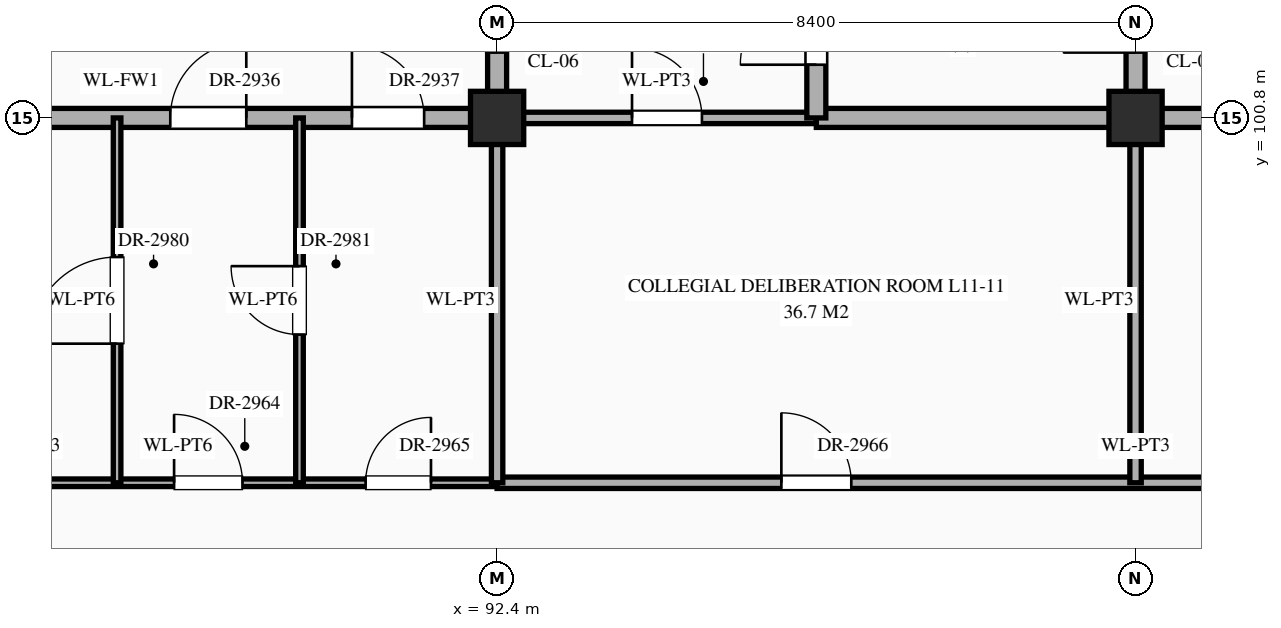
"""IFC4 building model, lengths in metres.
Left out: names, types, materials, properties, quantities, classifications, styles, units other than length and angle.
Written with IfcOpenShell. Run it as: python <this file> out.ifc"""

import sys

from ifc_helpers import new_model, si_unit, direction, frame, frame_2d, origin, origin_2d, place, context, subcontext, project, spatial, rectangle, extrude, element, fill, save


model = new_model("IFC4")
c1 = context("Model", 3, precision=1e-05, world=origin(), true_north=direction((0.0, 1.0)))
c2 = subcontext(c1, "Body", "Model", "MODEL_VIEW")
j1 = project(units=[si_unit("LENGTHUNIT", "METRE"), si_unit("PLANEANGLEUNIT", "RADIAN")], contexts=[c1])
p1 = place(None, origin())
s1 = spatial("IfcSite", under=j1, at=p1, CompositionType="ELEMENT")
p2 = place(p1, origin())
s2 = spatial("IfcBuilding", under=s1, at=p2, CompositionType="ELEMENT")
p3 = place(p2, frame((0.0, 0.0, 47.7)))
s3 = spatial("IfcBuildingStorey", under=s2, at=p3, CompositionType="ELEMENT", Elevation=47.7)
for number, where, z_axis, x_axis in (
    (1, (92.4, 100.8, 0.0), (0.0, 0.0, 1.0), (1.0, 0.0, 0.0)),
    (2, (100.8, 100.8, 0.0), (0.0, 0.0, 1.0), (1.0, 0.0, 0.0)),
):
    element("IfcColumn", number, at=place(p3, frame(where, z_axis=z_axis, x_axis=x_axis)), inside=s3, PredefinedType="COLUMN", context=c2, shape_type="SweptSolid", body=[
        extrude(rectangle(XDim=0.7, YDim=0.7, at=origin_2d()), origin(), (0.0, 0.0, 1.0), 4.2),
    ])
p4 = place(p3, frame((84.0, 96.0, 0.0), z_axis=(0.0, 0.0, 1.0), x_axis=(1.0, 0.0, 0.0)))
e3 = element("IfcWall", 3, at=p4, inside=s3, PredefinedType="STANDARD", context=c2, shape_type="SweptSolid", body=[
    extrude(rectangle(XDim=8.4, YDim=0.1, at=frame_2d((4.2, 0.0))), origin(), (0.0, 0.0, 1.0), 3.96),
])
p5 = place(p4, frame((1.13, 0.0, 0.0)))
e4 = element("IfcOpeningElement", 4, at=p5, cuts=e3, PredefinedType="OPENING", context=c2, shape_type="SweptSolid", body=[
    extrude(rectangle(XDim=1.14, YDim=2.4, at=frame_2d((0.57, 1.2))), frame((0.0, 0.062, 0.0), z_axis=(0.0, -1.0, 0.0), x_axis=(1.0, 0.0, 0.0)), (0.0, 0.0, 1.0), 0.124),
])
p6 = place(p4, frame((4.15, 0.0, 0.0)))
e5 = element("IfcOpeningElement", 5, at=p6, cuts=e3, PredefinedType="OPENING", context=c2, shape_type="SweptSolid", body=[
    extrude(rectangle(XDim=0.9, YDim=2.15, at=frame_2d((0.45, 1.075))), frame((0.0, 0.062, 0.0), z_axis=(0.0, -1.0, 0.0), x_axis=(1.0, 0.0, 0.0)), (0.0, 0.0, 1.0), 0.124),
])
p7 = place(p4, frame((6.67, 0.0, 0.0)))
e6 = element("IfcOpeningElement", 6, at=p7, cuts=e3, PredefinedType="OPENING", context=c2, shape_type="SweptSolid", body=[
    extrude(rectangle(XDim=0.86, YDim=2.1, at=frame_2d((0.43, 1.05))), frame((0.0, 0.062, 0.0), z_axis=(0.0, -1.0, 0.0), x_axis=(1.0, 0.0, 0.0)), (0.0, 0.0, 1.0), 0.124),
])
p8 = place(p3, frame((92.4, 96.0, 0.0), z_axis=(0.0, 0.0, 1.0), x_axis=(1.0, 0.0, 0.0)))
e7 = element("IfcWall", 7, at=p8, inside=s3, PredefinedType="STANDARD", context=c2, shape_type="SweptSolid", body=[
    extrude(rectangle(XDim=16.8, YDim=0.15, at=frame_2d((8.4, 0.0))), origin(), (0.0, 0.0, 1.0), 3.96),
])
p9 = place(p8, frame((3.74, 0.0, 0.0)))
e8 = element("IfcOpeningElement", 8, at=p9, cuts=e7, PredefinedType="OPENING", context=c2, shape_type="SweptSolid", body=[
    extrude(rectangle(XDim=0.92, YDim=2.15, at=frame_2d((0.46, 1.075))), frame((0.0, 0.087, 0.0), z_axis=(0.0, -1.0, 0.0), x_axis=(1.0, 0.0, 0.0)), (0.0, 0.0, 1.0), 0.174),
])
p10 = place(p8, frame((12.12, 0.0, 0.0)))
e9 = element("IfcOpeningElement", 9, at=p10, cuts=e7, PredefinedType="OPENING", context=c2, shape_type="SweptSolid", body=[
    extrude(rectangle(XDim=0.96, YDim=2.2, at=frame_2d((0.48, 1.1))), frame((0.0, 0.087, 0.0), z_axis=(0.0, -1.0, 0.0), x_axis=(1.0, 0.0, 0.0)), (0.0, 0.0, 1.0), 0.174),
])
p11 = place(p3, frame((75.6, 100.8, 0.0), z_axis=(0.0, 0.0, 1.0), x_axis=(1.0, 0.0, 0.0)))
e10 = element("IfcWall", 10, at=p11, inside=s3, PredefinedType="STANDARD", context=c2, shape_type="SweptSolid", body=[
    extrude(rectangle(XDim=16.8, YDim=0.25, at=frame_2d((8.4, 0.0))), origin(), (0.0, 0.0, 1.0), 3.11),
])
p12 = place(p11, frame((3.725, 0.0, 0.0)))
e11 = element("IfcOpeningElement", 11, at=p12, cuts=e10, PredefinedType="OPENING", context=c2, shape_type="SweptSolid", body=[
    extrude(rectangle(XDim=0.95, YDim=2.15, at=frame_2d((0.475, 1.075))), frame((0.0, 0.137, 0.0), z_axis=(0.0, -1.0, 0.0), x_axis=(1.0, 0.0, 0.0)), (0.0, 0.0, 1.0), 0.274),
])
p13 = place(p11, frame((9.685, 0.0, 0.0)))
e12 = element("IfcOpeningElement", 12, at=p13, cuts=e10, PredefinedType="OPENING", context=c2, shape_type="SweptSolid", body=[
    extrude(rectangle(XDim=1.1, YDim=2.2, at=frame_2d((0.55, 1.1))), frame((0.0, 0.137, 0.0), z_axis=(0.0, -1.0, 0.0), x_axis=(1.0, 0.0, 0.0)), (0.0, 0.0, 1.0), 0.274),
])
p14 = place(p11, frame((12.5, 0.0, 0.0)))
e13 = element("IfcOpeningElement", 13, at=p14, cuts=e10, PredefinedType="OPENING", context=c2, shape_type="SweptSolid", body=[
    extrude(rectangle(XDim=1.0, YDim=2.2, at=frame_2d((0.5, 1.1))), frame((0.0, 0.137, 0.0), z_axis=(0.0, -1.0, 0.0), x_axis=(1.0, 0.0, 0.0)), (0.0, 0.0, 1.0), 0.274),
])
p15 = place(p11, frame((14.89, 0.0, 0.0)))
e14 = element("IfcOpeningElement", 14, at=p15, cuts=e10, PredefinedType="OPENING", context=c2, shape_type="SweptSolid", body=[
    extrude(rectangle(XDim=0.95, YDim=2.15, at=frame_2d((0.475, 1.075))), frame((0.0, 0.137, 0.0), z_axis=(0.0, -1.0, 0.0), x_axis=(1.0, 0.0, 0.0)), (0.0, 0.0, 1.0), 0.274),
])
p16 = place(p3, frame((92.4, 100.8, 0.0), z_axis=(0.0, 0.0, 1.0), x_axis=(1.0, 0.0, 0.0)))
e15 = element("IfcWall", 15, at=p16, inside=s3, PredefinedType="STANDARD", context=c2, shape_type="SweptSolid", body=[
    extrude(rectangle(XDim=4.2, YDim=0.15, at=frame_2d((2.1, 0.0))), origin(), (0.0, 0.0, 1.0), 3.11),
])
p17 = place(p16, frame((1.775, 0.0, 0.0)))
e16 = element("IfcOpeningElement", 16, at=p17, cuts=e15, PredefinedType="OPENING", context=c2, shape_type="SweptSolid", body=[
    extrude(rectangle(XDim=0.92, YDim=2.15, at=frame_2d((0.46, 1.075))), frame((0.0, 0.087, 0.0), z_axis=(0.0, -1.0, 0.0), x_axis=(1.0, 0.0, 0.0)), (0.0, 0.0, 1.0), 0.174),
])
p18 = place(p3, frame((96.6, 100.8, 0.0), z_axis=(0.0, 0.0, 1.0), x_axis=(1.0, 0.0, 0.0)))
e17 = element("IfcWall", 17, at=p18, inside=s3, PredefinedType="STANDARD", context=c2, shape_type="SweptSolid", body=[
    extrude(rectangle(XDim=12.6, YDim=0.25, at=frame_2d((6.3, 0.0))), origin(), (0.0, 0.0, 1.0), 3.11),
])
p19 = place(p18, frame((7.9, 0.0, 0.0)))
e18 = element("IfcOpeningElement", 18, at=p19, cuts=e17, PredefinedType="OPENING", context=c2, shape_type="SweptSolid", body=[
    extrude(rectangle(XDim=1.0, YDim=2.2, at=frame_2d((0.5, 1.1))), frame((0.0, 0.137, 0.0), z_axis=(0.0, -1.0, 0.0), x_axis=(1.0, 0.0, 0.0)), (0.0, 0.0, 1.0), 0.274),
])
p20 = place(p3, frame((87.4, 96.0, 0.0), z_axis=(0.0, 0.0, 1.0), x_axis=(0.0, 1.0, 0.0)))
e19 = element("IfcWall", 19, at=p20, inside=s3, PredefinedType="STANDARD", context=c2, shape_type="SweptSolid", body=[
    extrude(rectangle(XDim=4.8, YDim=0.1, at=frame_2d((2.4, 0.0))), origin(), (0.0, 0.0, 1.0), 3.96),
])
p21 = place(p20, frame((1.83, 0.0, 0.0)))
e20 = element("IfcOpeningElement", 20, at=p21, cuts=e19, PredefinedType="OPENING", context=c2, shape_type="SweptSolid", body=[
    extrude(rectangle(XDim=1.14, YDim=2.4, at=frame_2d((0.57, 1.2))), frame((0.0, 0.062, 0.0), z_axis=(0.0, -1.0, 0.0), x_axis=(1.0, 0.0, 0.0)), (0.0, 0.0, 1.0), 0.124),
])
p22 = place(p3, frame((89.8, 96.0, 0.0), z_axis=(0.0, 0.0, 1.0), x_axis=(0.0, 1.0, 0.0)))
e21 = element("IfcWall", 21, at=p22, inside=s3, PredefinedType="STANDARD", context=c2, shape_type="SweptSolid", body=[
    extrude(rectangle(XDim=4.8, YDim=0.1, at=frame_2d((2.4, 0.0))), origin(), (0.0, 0.0, 1.0), 3.96),
])
p23 = place(p22, frame((1.95, 0.0, 0.0)))
e22 = element("IfcOpeningElement", 22, at=p23, cuts=e21, PredefinedType="OPENING", context=c2, shape_type="SweptSolid", body=[
    extrude(rectangle(XDim=0.9, YDim=2.15, at=frame_2d((0.45, 1.075))), frame((0.0, 0.062, 0.0), z_axis=(0.0, -1.0, 0.0), x_axis=(1.0, 0.0, 0.0)), (0.0, 0.0, 1.0), 0.124),
])
p24 = place(p3, frame((92.4, 96.0, 0.0), z_axis=(0.0, 0.0, 1.0), x_axis=(0.0, 1.0, 0.0)))
e23 = element("IfcWall", 23, at=p24, inside=s3, PredefinedType="STANDARD", context=c2, shape_type="SweptSolid", body=[
    extrude(rectangle(XDim=4.8, YDim=0.15, at=frame_2d((2.4, 0.0))), origin(), (0.0, 0.0, 1.0), 3.21),
])
p25 = place(p3, frame((92.4, 100.8, 0.0), z_axis=(0.0, 0.0, 1.0), x_axis=(0.0, 1.0, 0.0)))
e24 = element("IfcWall", 24, at=p25, inside=s3, PredefinedType="STANDARD", context=c2, shape_type="SweptSolid", body=[
    extrude(rectangle(XDim=3.6, YDim=0.25, at=frame_2d((1.8, 0.0))), origin(), (0.0, 0.0, 1.0), 3.21),
])
p26 = place(p25, frame((0.86, 0.0, 0.0)))
e25 = element("IfcOpeningElement", 25, at=p26, cuts=e24, PredefinedType="OPENING", context=c2, shape_type="SweptSolid", body=[
    extrude(rectangle(XDim=0.95, YDim=2.15, at=frame_2d((0.475, 1.075))), frame((0.0, 0.137, 0.0), z_axis=(0.0, -1.0, 0.0), x_axis=(1.0, 0.0, 0.0)), (0.0, 0.0, 1.0), 0.274),
])
p27 = place(p3, frame((96.6, 100.8, 0.0), z_axis=(0.0, 0.0, 1.0), x_axis=(0.0, 1.0, 0.0)))
e26 = element("IfcWall", 26, at=p27, inside=s3, PredefinedType="STANDARD", context=c2, shape_type="SweptSolid", body=[
    extrude(rectangle(XDim=3.6, YDim=0.25, at=frame_2d((1.8, 0.0))), origin(), (0.0, 0.0, 1.0), 3.96),
])
p28 = place(p27, frame((0.7, 0.0, 0.0)))
e27 = element("IfcOpeningElement", 27, at=p28, cuts=e26, PredefinedType="OPENING", context=c2, shape_type="SweptSolid", body=[
    extrude(rectangle(XDim=1.0, YDim=2.2, at=frame_2d((0.5, 1.1))), frame((0.0, 0.137, 0.0), z_axis=(0.0, -1.0, 0.0), x_axis=(1.0, 0.0, 0.0)), (0.0, 0.0, 1.0), 0.274),
])
p29 = place(p3, frame((100.8, 96.0, 0.0), z_axis=(0.0, 0.0, 1.0), x_axis=(0.0, 1.0, 0.0)))
e28 = element("IfcWall", 28, at=p29, inside=s3, PredefinedType="STANDARD", context=c2, shape_type="SweptSolid", body=[
    extrude(rectangle(XDim=4.8, YDim=0.15, at=frame_2d((2.4, 0.0))), origin(), (0.0, 0.0, 1.0), 3.21),
])
p30 = place(p3, frame((100.8, 100.8, 0.0), z_axis=(0.0, 0.0, 1.0), x_axis=(0.0, 1.0, 0.0)))
e29 = element("IfcWall", 29, at=p30, inside=s3, PredefinedType="STANDARD", context=c2, shape_type="SweptSolid", body=[
    extrude(rectangle(XDim=2.4, YDim=0.25, at=frame_2d((1.2, 0.0))), origin(), (0.0, 0.0, 1.0), 3.21),
])
p31 = place(p30, frame((0.86, 0.0, 0.0)))
e30 = element("IfcOpeningElement", 30, at=p31, cuts=e29, PredefinedType="OPENING", context=c2, shape_type="SweptSolid", body=[
    extrude(rectangle(XDim=0.95, YDim=2.15, at=frame_2d((0.475, 1.075))), frame((0.0, 0.137, 0.0), z_axis=(0.0, -1.0, 0.0), x_axis=(1.0, 0.0, 0.0)), (0.0, 0.0, 1.0), 0.274),
])
p32 = place(p28, origin())
e31 = element("IfcDoor", 31, at=p32, inside=s3, OperationType="SINGLE_SWING_LEFT", PredefinedType="DOOR", context=c2, shape_type="SweptSolid", body=[
    extrude(rectangle(XDim=1.0, YDim=2.2, at=frame_2d((0.5, 1.1))), frame((0.0, 0.025, 0.0), z_axis=(0.0, -1.0, 0.0), x_axis=(1.0, 0.0, 0.0)), (0.0, 0.0, 1.0), 0.05),
])
fill(e27, e31)
p33 = place(p17, origin())
e32 = element("IfcDoor", 32, at=p33, inside=s3, OperationType="SINGLE_SWING_LEFT", PredefinedType="DOOR", context=c2, shape_type="SweptSolid", body=[
    extrude(rectangle(XDim=0.92, YDim=2.15, at=frame_2d((0.46, 1.075))), frame((0.0, 0.025, 0.0), z_axis=(0.0, -1.0, 0.0), x_axis=(1.0, 0.0, 0.0)), (0.0, 0.0, 1.0), 0.05),
])
fill(e16, e32)
p34 = place(p14, origin())
e33 = element("IfcDoor", 33, at=p34, inside=s3, OperationType="SINGLE_SWING_RIGHT", PredefinedType="DOOR", context=c2, shape_type="SweptSolid", body=[
    extrude(rectangle(XDim=1.0, YDim=2.2, at=frame_2d((0.5, 1.1))), frame((0.0, 0.025, 0.0), z_axis=(0.0, -1.0, 0.0), x_axis=(1.0, 0.0, 0.0)), (0.0, 0.0, 1.0), 0.05),
])
fill(e13, e33)
p35 = place(p15, origin())
e34 = element("IfcDoor", 34, at=p35, inside=s3, OperationType="SINGLE_SWING_LEFT", PredefinedType="DOOR", context=c2, shape_type="SweptSolid", body=[
    extrude(rectangle(XDim=0.95, YDim=2.15, at=frame_2d((0.475, 1.075))), frame((0.0, 0.025, 0.0), z_axis=(0.0, -1.0, 0.0), x_axis=(1.0, 0.0, 0.0)), (0.0, 0.0, 1.0), 0.05),
])
fill(e14, e34)
p36 = place(p6, origin())
e35 = element("IfcDoor", 35, at=p36, inside=s3, OperationType="SINGLE_SWING_LEFT", PredefinedType="DOOR", context=c2, shape_type="SweptSolid", body=[
    extrude(rectangle(XDim=0.9, YDim=2.15, at=frame_2d((0.45, 1.075))), frame((0.0, 0.025, 0.0), z_axis=(0.0, -1.0, 0.0), x_axis=(1.0, 0.0, 0.0)), (0.0, 0.0, 1.0), 0.05),
])
fill(e5, e35)
p37 = place(p7, origin())
e36 = element("IfcDoor", 36, at=p37, inside=s3, OperationType="SINGLE_SWING_RIGHT", PredefinedType="DOOR", context=c2, shape_type="SweptSolid", body=[
    extrude(rectangle(XDim=0.86, YDim=2.1, at=frame_2d((0.43, 1.05))), frame((0.0, 0.025, 0.0), z_axis=(0.0, -1.0, 0.0), x_axis=(1.0, 0.0, 0.0)), (0.0, 0.0, 1.0), 0.05),
])
fill(e6, e36)
p38 = place(p9, origin())
e37 = element("IfcDoor", 37, at=p38, inside=s3, OperationType="SINGLE_SWING_LEFT", PredefinedType="DOOR", context=c2, shape_type="SweptSolid", body=[
    extrude(rectangle(XDim=0.92, YDim=2.15, at=frame_2d((0.46, 1.075))), frame((0.0, 0.025, 0.0), z_axis=(0.0, -1.0, 0.0), x_axis=(1.0, 0.0, 0.0)), (0.0, 0.0, 1.0), 0.05),
])
fill(e8, e37)
p39 = place(p21, origin())
e38 = element("IfcDoor", 38, at=p39, inside=s3, OperationType="SINGLE_SWING_LEFT", PredefinedType="DOOR", context=c2, shape_type="SweptSolid", body=[
    extrude(rectangle(XDim=1.14, YDim=2.4, at=frame_2d((0.57, 1.2))), frame((0.0, 0.025, 0.0), z_axis=(0.0, -1.0, 0.0), x_axis=(1.0, 0.0, 0.0)), (0.0, 0.0, 1.0), 0.05),
])
fill(e20, e38)
p40 = place(p23, origin())
e39 = element("IfcDoor", 39, at=p40, inside=s3, OperationType="SINGLE_SWING_RIGHT", PredefinedType="DOOR", context=c2, shape_type="SweptSolid", body=[
    extrude(rectangle(XDim=0.9, YDim=2.15, at=frame_2d((0.45, 1.075))), frame((0.0, 0.025, 0.0), z_axis=(0.0, -1.0, 0.0), x_axis=(1.0, 0.0, 0.0)), (0.0, 0.0, 1.0), 0.05),
])
fill(e22, e39)
save(model, sys.argv[1])
